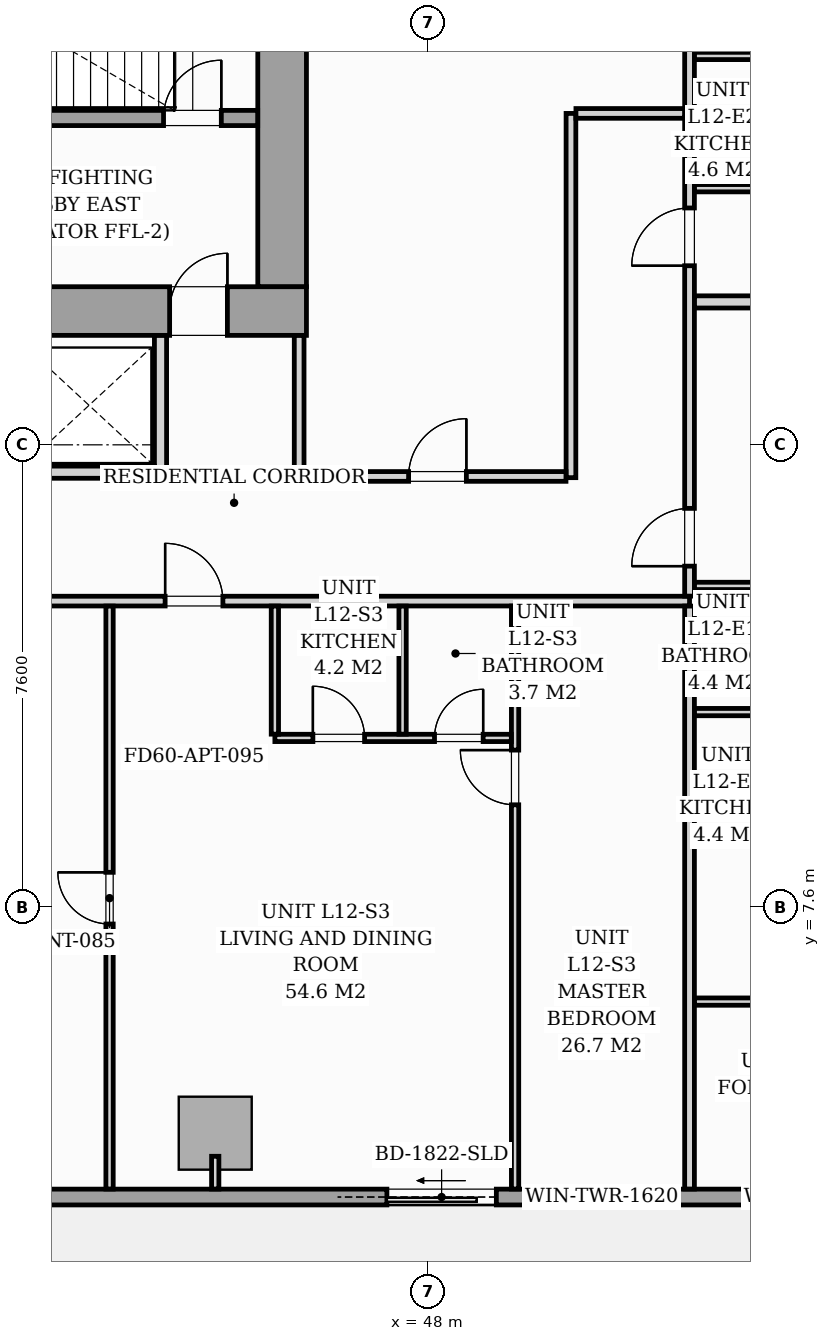
"""IFC4 building model, lengths in metres.
Left out: names, types, materials, properties, quantities, classifications, styles, units other than length and angle.
Written with IfcOpenShell. Run it as: python <this file> out.ifc"""

import sys

from ifc_helpers import new_model, si_unit, direction, frame, frame_2d, origin, origin_2d, place, context, subcontext, project, spatial, rectangle, i_section, extrude, source, transform, mapped, element, fill, save


model = new_model("IFC4")
c1 = context("Model", 3, precision=1e-05, world=origin(), true_north=direction((0.0, 1.0)))
c2 = subcontext(c1, "Body", "Model", "MODEL_VIEW")
j1 = project(units=[si_unit("LENGTHUNIT", "METRE"), si_unit("PLANEANGLEUNIT", "RADIAN")], contexts=[c1])
p1 = place(None, origin())
s1 = spatial("IfcSite", under=j1, at=p1, CompositionType="ELEMENT")
p2 = place(p1, origin())
s2 = spatial("IfcBuilding", under=s1, at=p2, CompositionType="ELEMENT")
p3 = place(p2, frame((0.0, 0.0, 45.4)))
s3 = spatial("IfcBuildingStorey", under=s2, at=p3, CompositionType="ELEMENT", Elevation=45.4)
m1 = source(origin(), c2, "Body", "SweptSolid", [
    extrude(i_section(OverallWidth=0.437, OverallDepth=0.514, WebThickness=0.061, FlangeThickness=0.097, FilletRadius=0.018, at=origin_2d()), origin(), (0.0, 0.0, 1.0), 3.196),
])
p4 = place(p3, frame((45.6, 17.4, 0.002), z_axis=(0.0, 0.0, 1.0), x_axis=(1.0, 0.0, 0.0)))
e1 = element("IfcColumn", 1, at=p4, inside=s3, PredefinedType="PILASTER", context=c2, shape_type="MappedRepresentation", body=[
    mapped(m1, transform((0.0, 0.0, 0.0), scale=1.0)),
])
m2 = source(origin(), c2, "Body", "SweptSolid", [
    extrude(rectangle(XDim=1.2, YDim=1.2, at=origin_2d()), origin(), (0.0, 0.0, 1.0), 3.196),
])
p5 = place(p3, frame((44.5, 3.88, 0.002), z_axis=(0.0, 0.0, 1.0), x_axis=(1.0, 0.0, 0.0)))
e2 = element("IfcColumn", 2, at=p5, inside=s3, PredefinedType="COLUMN", context=c2, shape_type="MappedRepresentation", body=[
    mapped(m2, transform((0.0, 0.0, 0.0), scale=1.0)),
])
p6 = place(p3, frame((57.3, 2.83, 0.0), z_axis=(0.0, 0.0, 1.0), x_axis=(-1.0, 0.0, 0.0)))
e3 = element("IfcWall", 3, at=p6, inside=s3, PredefinedType="STANDARD", context=c2, shape_type="SweptSolid", body=[
    extrude(rectangle(XDim=17.15, YDim=0.26, at=frame_2d((8.575, 0.0))), origin(), (0.0, 0.0, 1.0), 2.94),
])
p7 = place(p6, frame((8.177, 0.0, 0.0)))
e4 = element("IfcOpeningElement", 4, at=p7, cuts=e3, PredefinedType="OPENING", context=c2, shape_type="SweptSolid", body=[
    extrude(rectangle(XDim=1.8, YDim=2.06, at=frame_2d((0.9, 1.03))), frame((0.0, 0.14, 0.0), z_axis=(0.0, -1.0, 0.0), x_axis=(1.0, 0.0, 0.0)), (0.0, 0.0, 1.0), 0.28),
])
p8 = place(p6, frame((2.05, 0.0, 0.65)))
e5 = element("IfcOpeningElement", 5, at=p8, cuts=e3, PredefinedType="OPENING", context=c2, shape_type="SweptSolid", body=[
    extrude(rectangle(XDim=1.6, YDim=1.5, at=frame_2d((0.8, 0.75))), frame((0.0, 0.14, 0.0), z_axis=(0.0, -1.0, 0.0), x_axis=(1.0, 0.0, 0.0)), (0.0, 0.0, 1.0), 0.28),
])
p9 = place(p6, frame((5.644, 0.0, 0.75)))
e6 = element("IfcOpeningElement", 6, at=p9, cuts=e3, PredefinedType="OPENING", context=c2, shape_type="SweptSolid", body=[
    extrude(rectangle(XDim=1.6, YDim=1.5, at=frame_2d((0.8, 0.75))), frame((0.0, 0.14, 0.0), z_axis=(0.0, -1.0, 0.0), x_axis=(1.0, 0.0, 0.0)), (0.0, 0.0, 1.0), 0.28),
])
p10 = place(p3, frame((26.0, 17.4, 0.0), z_axis=(0.0, 0.0, 1.0), x_axis=(1.0, 0.0, 0.0)))
e7 = element("IfcWall", 7, at=p10, inside=s3, PredefinedType="SHEAR", context=c2, shape_type="SweptSolid", body=[
    extrude(rectangle(XDim=20.0, YDim=0.8, at=frame_2d((10.0, 0.0))), origin(), (0.0, 0.0, 1.0), 3.2),
])
p11 = place(p10, frame((1.15, 0.0, 0.0)))
e8 = element("IfcOpeningElement", 8, at=p11, cuts=e7, PredefinedType="OPENING", context=c2, shape_type="SweptSolid", body=[
    extrude(rectangle(XDim=0.95, YDim=2.06, at=frame_2d((0.475, 1.03))), frame((0.0, 0.41, 0.0), z_axis=(0.0, -1.0, 0.0), x_axis=(1.0, 0.0, 0.0)), (0.0, 0.0, 1.0), 0.82),
])
p12 = place(p10, frame((9.58, 0.0, 0.0)))
e9 = element("IfcOpeningElement", 9, at=p12, cuts=e7, PredefinedType="OPENING", context=c2, shape_type="SweptSolid", body=[
    extrude(rectangle(XDim=0.85, YDim=2.0, at=frame_2d((0.425, 1.0))), frame((0.0, 0.41, 0.0), z_axis=(0.0, -1.0, 0.0), x_axis=(1.0, 0.0, 0.0)), (0.0, 0.0, 1.0), 0.82),
])
p13 = place(p10, frame((17.75, 0.0, 0.0)))
e10 = element("IfcOpeningElement", 10, at=p13, cuts=e7, PredefinedType="OPENING", context=c2, shape_type="SweptSolid", body=[
    extrude(rectangle(XDim=0.95, YDim=2.06, at=frame_2d((0.475, 1.03))), frame((0.0, 0.41, 0.0), z_axis=(0.0, -1.0, 0.0), x_axis=(1.0, 0.0, 0.0)), (0.0, 0.0, 1.0), 0.82),
])
p14 = place(p3, frame((45.6, 17.802, 0.0), z_axis=(0.0, 0.0, 1.0), x_axis=(0.0, 1.0, 0.0)))
e11 = element("IfcWall", 11, at=p14, inside=s3, PredefinedType="SHEAR", context=c2, shape_type="SweptSolid", body=[
    extrude(rectangle(XDim=5.796, YDim=0.8, at=frame_2d((2.898, 0.0))), origin(), (0.0, 0.0, 1.0), 3.2),
])
p15 = place(p3, frame((37.05, 20.575, 0.0), z_axis=(0.0, 0.0, 1.0), x_axis=(1.0, 0.0, 0.0)))
e12 = element("IfcWall", 12, at=p15, inside=s3, PredefinedType="SOLIDWALL", context=c2, shape_type="SweptSolid", body=[
    extrude(rectangle(XDim=8.148, YDim=0.25, at=frame_2d((4.074, 0.0))), origin(), (0.0, 0.0, 1.0), 3.2),
])
p16 = place(p15, frame((6.6, 0.0, 0.0)))
e13 = element("IfcOpeningElement", 13, at=p16, cuts=e12, PredefinedType="OPENING", context=c2, shape_type="SweptSolid", body=[
    extrude(rectangle(XDim=0.95, YDim=2.06, at=frame_2d((0.475, 1.03))), frame((0.0, 0.135, 0.0), z_axis=(0.0, -1.0, 0.0), x_axis=(1.0, 0.0, 0.0)), (0.0, 0.0, 1.0), 0.27),
])
p17 = place(p3, frame((43.6, 14.75, 0.0), z_axis=(0.0, 0.0, 1.0), x_axis=(0.0, 1.0, 0.0)))
e14 = element("IfcWall", 14, at=p17, inside=s3, PredefinedType="PARTITIONING", context=c2, shape_type="SweptSolid", body=[
    extrude(rectangle(XDim=2.248, YDim=0.2, at=frame_2d((1.124, 0.0))), origin(), (0.0, 0.0, 1.0), 2.94),
])
p18 = place(p3, frame((41.352, 14.75, 0.0), z_axis=(0.0, 0.0, 1.0), x_axis=(1.0, 0.0, 0.0)))
e15 = element("IfcWall", 15, at=p18, inside=s3, PredefinedType="PARTITIONING", context=c2, shape_type="SweptSolid", body=[
    extrude(rectangle(XDim=2.146, YDim=0.2, at=frame_2d((1.073, 0.0))), origin(), (0.0, 0.0, 1.0), 2.94),
])
p19 = place(p3, frame((15.2, 12.63, 0.0), z_axis=(0.0, 0.0, 1.0), x_axis=(1.0, 0.0, 0.0)))
e16 = element("IfcWall", 16, at=p19, inside=s3, PredefinedType="PARTITIONING", context=c2, shape_type="SweptSolid", body=[
    extrude(rectangle(XDim=37.1, YDim=0.16, at=frame_2d((18.55, 0.0))), origin(), (0.0, 0.0, 1.0), 2.94),
])
p20 = place(p19, frame((1.572, 0.0, 0.0)))
e17 = element("IfcOpeningElement", 17, at=p20, cuts=e16, PredefinedType="OPENING", context=c2, shape_type="SweptSolid", body=[
    extrude(rectangle(XDim=0.95, YDim=2.06, at=frame_2d((0.475, 1.03))), frame((0.0, 0.09, 0.0), z_axis=(0.0, -1.0, 0.0), x_axis=(1.0, 0.0, 0.0)), (0.0, 0.0, 1.0), 0.18),
])
p21 = place(p19, frame((14.877, 0.0, 0.0)))
e18 = element("IfcOpeningElement", 18, at=p21, cuts=e16, PredefinedType="OPENING", context=c2, shape_type="SweptSolid", body=[
    extrude(rectangle(XDim=0.95, YDim=2.06, at=frame_2d((0.475, 1.03))), frame((0.0, 0.09, 0.0), z_axis=(0.0, -1.0, 0.0), x_axis=(1.0, 0.0, 0.0)), (0.0, 0.0, 1.0), 0.18),
])
p22 = place(p19, frame((28.476, 0.0, 0.0)))
e19 = element("IfcOpeningElement", 19, at=p22, cuts=e16, PredefinedType="OPENING", context=c2, shape_type="SweptSolid", body=[
    extrude(rectangle(XDim=0.95, YDim=2.06, at=frame_2d((0.475, 1.03))), frame((0.0, 0.09, 0.0), z_axis=(0.0, -1.0, 0.0), x_axis=(1.0, 0.0, 0.0)), (0.0, 0.0, 1.0), 0.18),
])
p23 = place(p3, frame((52.3, 2.962, 0.0), z_axis=(0.0, 0.0, 1.0), x_axis=(0.0, 1.0, 0.0)))
e20 = element("IfcWall", 20, at=p23, inside=s3, PredefinedType="PARTITIONING", context=c2, shape_type="SweptSolid", body=[
    extrude(rectangle(XDim=9.586, YDim=0.16, at=frame_2d((4.793, 0.0))), origin(), (0.0, 0.0, 1.0), 2.94),
])
p24 = place(p3, frame((52.3, 12.712, 0.0), z_axis=(0.0, 0.0, 1.0), x_axis=(0.0, 1.0, 0.0)))
e21 = element("IfcWall", 21, at=p24, inside=s3, PredefinedType="PARTITIONING", context=c2, shape_type="SweptSolid", body=[
    extrude(rectangle(XDim=14.726, YDim=0.16, at=frame_2d((7.363, 0.0))), origin(), (0.0, 0.0, 1.0), 2.94),
])
p25 = place(p24, frame((0.493, 0.0, 0.0)))
e22 = element("IfcOpeningElement", 22, at=p25, cuts=e21, PredefinedType="OPENING", context=c2, shape_type="SweptSolid", body=[
    extrude(rectangle(XDim=0.95, YDim=2.06, at=frame_2d((0.475, 1.03))), frame((0.0, 0.09, 0.0), z_axis=(0.0, -1.0, 0.0), x_axis=(1.0, 0.0, 0.0)), (0.0, 0.0, 1.0), 0.18),
])
p26 = place(p24, frame((5.433, 0.0, 0.0)))
e23 = element("IfcOpeningElement", 23, at=p26, cuts=e21, PredefinedType="OPENING", context=c2, shape_type="SweptSolid", body=[
    extrude(rectangle(XDim=0.95, YDim=2.06, at=frame_2d((0.475, 1.03))), frame((0.0, 0.09, 0.0), z_axis=(0.0, -1.0, 0.0), x_axis=(1.0, 0.0, 0.0)), (0.0, 0.0, 1.0), 0.18),
])
p27 = place(p3, frame((49.431, 2.962, 0.0), z_axis=(0.0, 0.0, 1.0), x_axis=(0.0, 1.0, 0.0)))
e24 = element("IfcWall", 24, at=p27, inside=s3, PredefinedType="PARTITIONING", context=c2, shape_type="SweptSolid", body=[
    extrude(rectangle(XDim=9.586, YDim=0.12, at=frame_2d((4.793, 0.0))), origin(), (0.0, 0.0, 1.0), 2.94),
])
p28 = place(p27, frame((6.318, 0.0, 0.0)))
e25 = element("IfcOpeningElement", 25, at=p28, cuts=e24, PredefinedType="OPENING", context=c2, shape_type="SweptSolid", body=[
    extrude(rectangle(XDim=0.9, YDim=2.05, at=frame_2d((0.45, 1.025))), frame((0.0, 0.07, 0.0), z_axis=(0.0, -1.0, 0.0), x_axis=(1.0, 0.0, 0.0)), (0.0, 0.0, 1.0), 0.14),
])
p29 = place(p3, frame((45.481, 10.38, 0.0), z_axis=(0.0, 0.0, 1.0), x_axis=(1.0, 0.0, 0.0)))
e26 = element("IfcWall", 26, at=p29, inside=s3, PredefinedType="PARTITIONING", context=c2, shape_type="SweptSolid", body=[
    extrude(rectangle(XDim=3.888, YDim=0.12, at=frame_2d((1.944, 0.0))), origin(), (0.0, 0.0, 1.0), 2.94),
])
p30 = place(p29, frame((0.625, 0.0, 0.0)))
e27 = element("IfcOpeningElement", 27, at=p30, cuts=e26, PredefinedType="OPENING", context=c2, shape_type="SweptSolid", body=[
    extrude(rectangle(XDim=0.85, YDim=2.05, at=frame_2d((0.425, 1.025))), frame((0.0, 0.07, 0.0), z_axis=(0.0, -1.0, 0.0), x_axis=(1.0, 0.0, 0.0)), (0.0, 0.0, 1.0), 0.14),
])
p31 = place(p29, frame((2.625, 0.0, 0.0)))
e28 = element("IfcOpeningElement", 28, at=p31, cuts=e26, PredefinedType="OPENING", context=c2, shape_type="SweptSolid", body=[
    extrude(rectangle(XDim=0.8, YDim=2.02, at=frame_2d((0.4, 1.01))), frame((0.0, 0.07, 0.0), z_axis=(0.0, -1.0, 0.0), x_axis=(1.0, 0.0, 0.0)), (0.0, 0.0, 1.0), 0.14),
])
for number, where, z_axis, x_axis in (
    (29, (47.581, 10.442, 0.0), (0.0, 0.0, 1.0), (0.0, 1.0, 0.0)),
    (30, (45.481, 10.442, 0.0), (0.0, 0.0, 1.0), (0.0, 1.0, 0.0)),
):
    element("IfcWall", number, at=place(p3, frame(where, z_axis=z_axis, x_axis=x_axis)), inside=s3, PredefinedType="PARTITIONING", context=c2, shape_type="SweptSolid", body=[
        extrude(rectangle(XDim=2.106, YDim=0.12, at=frame_2d((1.053, 0.0))), origin(), (0.0, 0.0, 1.0), 2.94),
    ])
p32 = place(p3, frame((42.762, 2.962, 0.0), z_axis=(0.0, 0.0, 1.0), x_axis=(0.0, 1.0, 0.0)))
e31 = element("IfcWall", 31, at=p32, inside=s3, PredefinedType="PARTITIONING", context=c2, shape_type="SweptSolid", body=[
    extrude(rectangle(XDim=9.586, YDim=0.12, at=frame_2d((4.793, 0.0))), origin(), (0.0, 0.0, 1.0), 2.94),
])
p33 = place(p32, frame((4.358, 0.0, 0.0)))
e32 = element("IfcOpeningElement", 32, at=p33, cuts=e31, PredefinedType="OPENING", context=c2, shape_type="SweptSolid", body=[
    extrude(rectangle(XDim=0.85, YDim=2.05, at=frame_2d((0.425, 1.025))), frame((0.0, 0.07, 0.0), z_axis=(0.0, -1.0, 0.0), x_axis=(1.0, 0.0, 0.0)), (0.0, 0.0, 1.0), 0.14),
])
p34 = place(p3, frame((52.382, 17.55, 0.0), z_axis=(0.0, 0.0, 1.0), x_axis=(1.0, 0.0, 0.0)))
e33 = element("IfcWall", 33, at=p34, inside=s3, PredefinedType="PARTITIONING", context=c2, shape_type="SweptSolid", body=[
    extrude(rectangle(XDim=7.338, YDim=0.2, at=frame_2d((3.669, 0.0))), origin(), (0.0, 0.0, 1.0), 2.94),
])
for number, where, z_axis, x_axis in (
    (34, (52.382, 10.805, 0.0), (0.0, 0.0, 1.0), (1.0, 0.0, 0.0)),
    (35, (52.382, 8.73, 0.0), (0.0, 0.0, 1.0), (1.0, 0.0, 0.0)),
    (36, (52.382, 12.88, 0.0), (0.0, 0.0, 1.0), (1.0, 0.0, 0.0)),
):
    element("IfcWall", number, at=place(p3, frame(where, z_axis=z_axis, x_axis=x_axis)), inside=s3, PredefinedType="PARTITIONING", context=c2, shape_type="SweptSolid", body=[
        extrude(rectangle(XDim=2.256, YDim=0.12, at=frame_2d((1.128, 0.0))), origin(), (0.0, 0.0, 1.0), 2.94),
    ])
p35 = place(p3, frame((52.382, 6.044, 0.0), z_axis=(0.0, 0.0, 1.0), x_axis=(1.0, 0.0, 0.0)))
e37 = element("IfcWall", 37, at=p35, inside=s3, PredefinedType="PARTITIONING", context=c2, shape_type="SweptSolid", body=[
    extrude(rectangle(XDim=7.338, YDim=0.12, at=frame_2d((3.669, 0.0))), origin(), (0.0, 0.0, 1.0), 2.94),
])
p36 = place(p35, frame((2.963, 0.0, 0.0)))
e38 = element("IfcOpeningElement", 38, at=p36, cuts=e37, PredefinedType="OPENING", context=c2, shape_type="SweptSolid", body=[
    extrude(rectangle(XDim=0.55, YDim=2.0, at=frame_2d((0.275, 1.0))), frame((0.0, 0.07, 0.0), z_axis=(0.0, -1.0, 0.0), x_axis=(1.0, 0.0, 0.0)), (0.0, 0.0, 1.0), 0.14),
])
for number, where, z_axis, x_axis in (
    (39, (52.382, 21.595, 0.0), (0.0, 0.0, 1.0), (1.0, 0.0, 0.0)),
    (40, (52.382, 19.42, 0.0), (0.0, 0.0, 1.0), (1.0, 0.0, 0.0)),
):
    element("IfcWall", number, at=place(p3, frame(where, z_axis=z_axis, x_axis=x_axis)), inside=s3, PredefinedType="PARTITIONING", context=c2, shape_type="SweptSolid", body=[
        extrude(rectangle(XDim=2.256, YDim=0.12, at=frame_2d((1.128, 0.0))), origin(), (0.0, 0.0, 1.0), 2.94),
    ])
p37 = place(p3, frame((50.35, 14.66, 0.0), z_axis=(0.0, 0.0, 1.0), x_axis=(0.0, 1.0, 0.0)))
e41 = element("IfcWall", 41, at=p37, inside=s3, PredefinedType="PARTITIONING", context=c2, shape_type="SweptSolid", body=[
    extrude(rectangle(XDim=5.99, YDim=0.16, at=frame_2d((2.995, 0.0))), origin(), (0.0, 0.0, 1.0), 2.94),
])
p38 = place(p3, frame((50.432, 20.65, 0.0), z_axis=(0.0, 0.0, 1.0), x_axis=(1.0, 0.0, 0.0)))
e42 = element("IfcWall", 42, at=p38, inside=s3, PredefinedType="PARTITIONING", context=c2, shape_type="SweptSolid", body=[
    extrude(rectangle(XDim=1.786, YDim=0.16, at=frame_2d((0.893, 0.0))), origin(), (0.0, 0.0, 1.0), 2.94),
])
p39 = place(p3, frame((45.84, 14.68, 0.0), z_axis=(0.0, 0.0, 1.0), x_axis=(1.0, 0.0, 0.0)))
e43 = element("IfcWall", 43, at=p39, inside=s3, PredefinedType="PARTITIONING", context=c2, shape_type="SweptSolid", body=[
    extrude(rectangle(XDim=4.428, YDim=0.16, at=frame_2d((2.214, 0.0))), origin(), (0.0, 0.0, 1.0), 2.94),
])
p40 = place(p39, frame((1.84, 0.0, 0.0)))
e44 = element("IfcOpeningElement", 44, at=p40, cuts=e43, PredefinedType="OPENING", context=c2, shape_type="SweptSolid", body=[
    extrude(rectangle(XDim=0.95, YDim=2.06, at=frame_2d((0.475, 1.03))), frame((0.0, 0.09, 0.0), z_axis=(0.0, -1.0, 0.0), x_axis=(1.0, 0.0, 0.0)), (0.0, 0.0, 1.0), 0.18),
])
p41 = place(p3, frame((45.88, 14.762, 0.0), z_axis=(0.0, 0.0, 1.0), x_axis=(0.0, 1.0, 0.0)))
e45 = element("IfcWall", 45, at=p41, inside=s3, PredefinedType="PARTITIONING", context=c2, shape_type="SweptSolid", body=[
    extrude(rectangle(XDim=2.236, YDim=0.16, at=frame_2d((1.118, 0.0))), origin(), (0.0, 0.0, 1.0), 2.94),
])
p42 = place(p3, frame((44.5, 3.5, 0.0), z_axis=(0.0, 0.0, 1.0), x_axis=(0.0, -1.0, 0.0)))
e46 = element("IfcWall", 46, at=p42, inside=s3, PredefinedType="PARTITIONING", context=c2, shape_type="SweptSolid", body=[
    extrude(rectangle(XDim=0.538, YDim=0.12, at=frame_2d((0.269, 0.0))), origin(), (0.0, 0.0, 1.0), 2.94),
])
m3 = source(origin(), c2, "Body", "SweptSolid", [
    extrude(rectangle(XDim=1.8, YDim=2.06, at=frame_2d((0.9, 1.03))), frame((0.0, 0.025, 0.0), z_axis=(0.0, -1.0, 0.0), x_axis=(1.0, 0.0, 0.0)), (0.0, 0.0, 1.0), 0.05),
])
p43 = place(p7, origin())
e47 = element("IfcDoor", 47, at=p43, inside=s3, OperationType="SLIDING_TO_RIGHT", PredefinedType="DOOR", context=c2, shape_type="MappedRepresentation", body=[
    mapped(m3, transform((0.0, 0.0, 0.0), scale=1.0)),
])
fill(e4, e47)
m4 = source(origin(), c2, "Body", "SweptSolid", [
    extrude(rectangle(XDim=1.6, YDim=1.5, at=frame_2d((0.8, 0.75))), frame((0.0, 0.03, 0.0), z_axis=(0.0, -1.0, 0.0), x_axis=(1.0, 0.0, 0.0)), (0.0, 0.0, 1.0), 0.06),
])
p44 = place(p9, origin())
e48 = element("IfcWindow", 48, at=p44, inside=s3, PartitioningType="SINGLE_PANEL", PredefinedType="WINDOW", context=c2, shape_type="MappedRepresentation", body=[
    mapped(m4, transform((0.0, 0.0, 0.0), scale=1.0)),
])
fill(e6, e48)
m5 = source(origin(), c2, "Body", "SweptSolid", [
    extrude(rectangle(XDim=0.95, YDim=2.06, at=frame_2d((0.475, 1.03))), frame((0.0, 0.025, 0.0), z_axis=(0.0, -1.0, 0.0), x_axis=(1.0, 0.0, 0.0)), (0.0, 0.0, 1.0), 0.05),
])
p45 = place(p13, origin())
e49 = element("IfcDoor", 49, at=p45, inside=s3, OperationType="SINGLE_SWING_RIGHT", PredefinedType="DOOR", context=c2, shape_type="MappedRepresentation", body=[
    mapped(m5, transform((0.0, 0.0, 0.0), scale=1.0)),
])
fill(e10, e49)
p46 = place(p16, origin())
e50 = element("IfcDoor", 50, at=p46, inside=s3, OperationType="SINGLE_SWING_RIGHT", PredefinedType="DOOR", context=c2, shape_type="MappedRepresentation", body=[
    mapped(m5, transform((0.0, 0.0, 0.0), scale=1.0)),
])
fill(e13, e50)
m6 = source(origin(), c2, "Body", "SweptSolid", [
    extrude(rectangle(XDim=0.85, YDim=2.05, at=frame_2d((0.425, 1.025))), frame((0.0, 0.025, 0.0), z_axis=(0.0, -1.0, 0.0), x_axis=(1.0, 0.0, 0.0)), (0.0, 0.0, 1.0), 0.05),
])
p47 = place(p33, origin())
e51 = element("IfcDoor", 51, at=p47, inside=s3, OperationType="SINGLE_SWING_RIGHT", PredefinedType="DOOR", context=c2, shape_type="MappedRepresentation", body=[
    mapped(m6, transform((0.0, 0.0, 0.0), scale=1.0)),
])
fill(e32, e51)
m7 = source(origin(), c2, "Body", "SweptSolid", [
    extrude(rectangle(XDim=0.95, YDim=2.06, at=frame_2d((0.475, 1.03))), frame((0.0, 0.025, 0.0), z_axis=(0.0, -1.0, 0.0), x_axis=(1.0, 0.0, 0.0)), (0.0, 0.0, 1.0), 0.05),
])
p48 = place(p22, origin())
e52 = element("IfcDoor", 52, at=p48, inside=s3, OperationType="SINGLE_SWING_LEFT", PredefinedType="DOOR", context=c2, shape_type="MappedRepresentation", body=[
    mapped(m7, transform((0.0, 0.0, 0.0), scale=1.0)),
])
fill(e19, e52)
m8 = source(origin(), c2, "Body", "SweptSolid", [
    extrude(rectangle(XDim=0.9, YDim=2.05, at=frame_2d((0.45, 1.025))), frame((0.0, 0.025, 0.0), z_axis=(0.0, -1.0, 0.0), x_axis=(1.0, 0.0, 0.0)), (0.0, 0.0, 1.0), 0.05),
])
p49 = place(p28, origin())
e53 = element("IfcDoor", 53, at=p49, inside=s3, OperationType="SINGLE_SWING_RIGHT", PredefinedType="DOOR", context=c2, shape_type="MappedRepresentation", body=[
    mapped(m8, transform((0.0, 0.0, 0.0), scale=1.0)),
])
fill(e25, e53)
p50 = place(p30, origin())
e54 = element("IfcDoor", 54, at=p50, inside=s3, OperationType="SINGLE_SWING_LEFT", PredefinedType="DOOR", context=c2, shape_type="MappedRepresentation", body=[
    mapped(m6, transform((0.0, 0.0, 0.0), scale=1.0)),
])
fill(e27, e54)
m9 = source(origin(), c2, "Body", "SweptSolid", [
    extrude(rectangle(XDim=0.8, YDim=2.02, at=frame_2d((0.4, 1.01))), frame((0.0, 0.025, 0.0), z_axis=(0.0, -1.0, 0.0), x_axis=(1.0, 0.0, 0.0)), (0.0, 0.0, 1.0), 0.05),
])
p51 = place(p31, origin())
e55 = element("IfcDoor", 55, at=p51, inside=s3, OperationType="SINGLE_SWING_RIGHT", PredefinedType="DOOR", context=c2, shape_type="MappedRepresentation", body=[
    mapped(m9, transform((0.0, 0.0, 0.0), scale=1.0)),
])
fill(e28, e55)
p52 = place(p25, origin())
e56 = element("IfcDoor", 56, at=p52, inside=s3, OperationType="SINGLE_SWING_LEFT", PredefinedType="DOOR", context=c2, shape_type="MappedRepresentation", body=[
    mapped(m7, transform((0.0, 0.0, 0.0), scale=1.0)),
])
fill(e22, e56)
p53 = place(p26, origin())
e57 = element("IfcDoor", 57, at=p53, inside=s3, OperationType="SINGLE_SWING_LEFT", PredefinedType="DOOR", context=c2, shape_type="MappedRepresentation", body=[
    mapped(m7, transform((0.0, 0.0, 0.0), scale=1.0)),
])
fill(e23, e57)
p54 = place(p40, origin())
e58 = element("IfcDoor", 58, at=p54, inside=s3, OperationType="SINGLE_SWING_RIGHT", PredefinedType="DOOR", context=c2, shape_type="MappedRepresentation", body=[
    mapped(m7, transform((0.0, 0.0, 0.0), scale=1.0)),
])
fill(e44, e58)
save(model, sys.argv[1])
